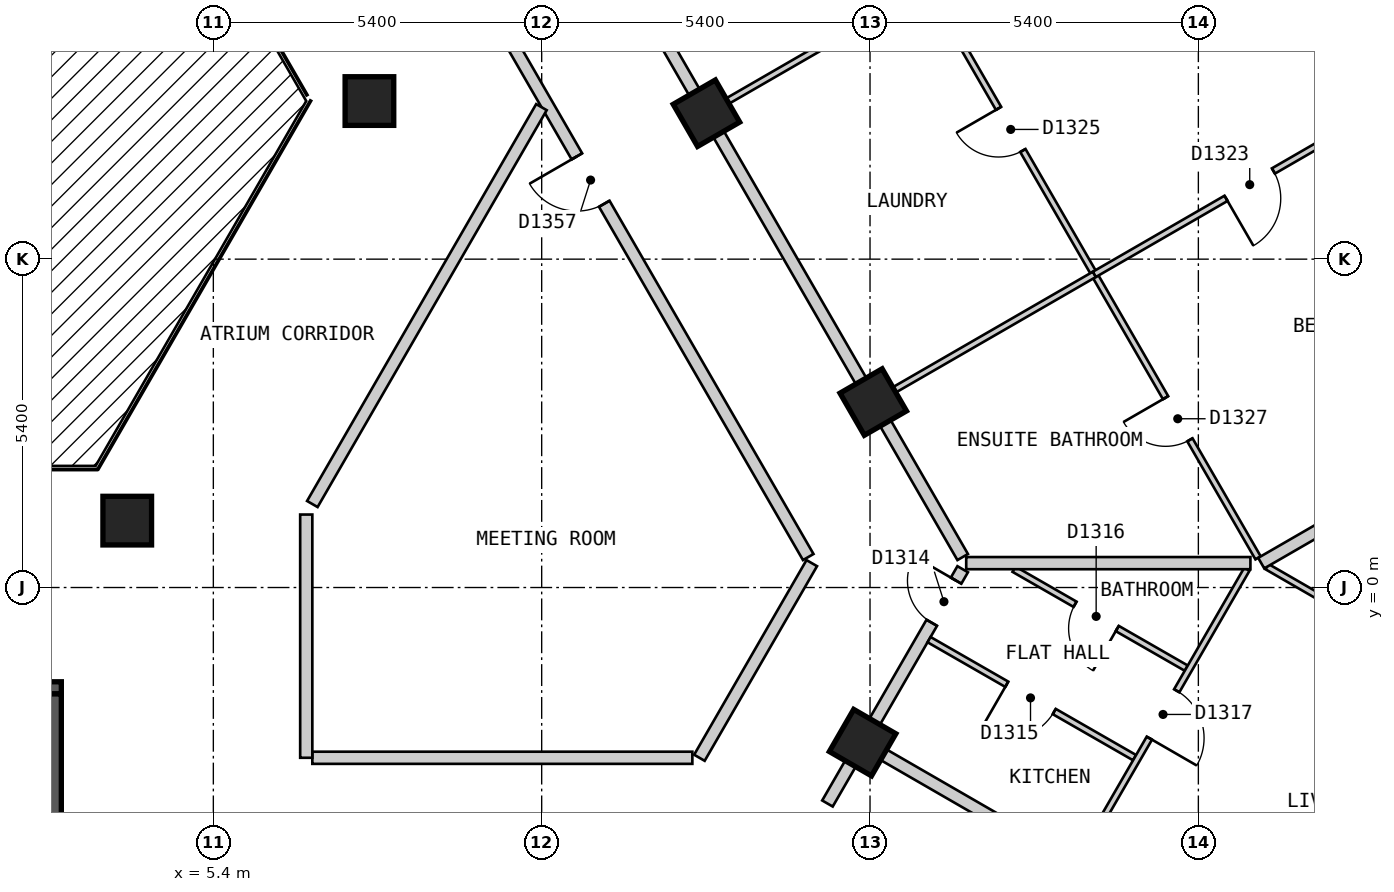
"""IFC4 building model, lengths in metres.
Left out: names, types, materials, properties, quantities, classifications, styles, units other than length and angle.
Written with IfcOpenShell. Run it as: python <this file> out.ifc"""

import sys

from ifc_helpers import new_model, si_unit, direction, frame, frame_2d, origin, origin_2d, place, context, subcontext, project, spatial, polyline, rectangle, outline, extrude, element, fill, save


model = new_model("IFC4")
c1 = context("Model", 3, precision=1e-05, world=origin(), true_north=direction((0.0, 1.0)))
c2 = subcontext(c1, "Body", "Model", "MODEL_VIEW")
j1 = project(units=[si_unit("LENGTHUNIT", "METRE"), si_unit("PLANEANGLEUNIT", "RADIAN")], contexts=[c1])
p1 = place(None, origin())
s1 = spatial("IfcSite", under=j1, at=p1, CompositionType="ELEMENT")
p2 = place(p1, origin())
s2 = spatial("IfcBuilding", under=s1, at=p2, CompositionType="ELEMENT")
p3 = place(p2, frame((0.0, 0.0, 135.6)))
s3 = spatial("IfcBuildingStorey", under=s2, at=p3, CompositionType="ELEMENT", Elevation=135.6)
for number, where, z_axis, x_axis in (
    (1, (16.078, -2.551, 0.0), (0.0, 0.0, 1.0), (0.5, 0.866, 0.0)),
    (2, (16.253, 3.05, 0.0), (0.0, 0.0, 1.0), (-0.5, 0.866, 0.0)),
    (3, (3.984, 1.1, 0.0), (0.0, 0.0, 1.0), (1.0, 0.0, 0.0)),
    (4, (13.51, 7.8, 0.0), (0.0, 0.0, 1.0), (-0.5, 0.866, 0.0)),
    (5, (7.967, 8.0, 0.0), (0.0, 0.0, 1.0), (1.0, 0.0, 0.0)),
):
    element("IfcColumn", number, at=place(p3, frame(where, z_axis=z_axis, x_axis=x_axis)), inside=s3, PredefinedType="COLUMN", context=c2, shape_type="SweptSolid", body=[
        extrude(rectangle(XDim=0.8, YDim=0.8, at=origin_2d()), origin(), (0.0, 0.0, 1.0), 3.0),
    ])
p4 = place(p3, frame((15.862, -23.425, 0.0), z_axis=(0.0, 0.0, 1.0), x_axis=(0.500017503135, 0.866015298109, 0.0)))
e6 = element("IfcWall", 6, at=p4, inside=s3, PredefinedType="SOLIDWALL", context=c2, shape_type="SweptSolid", body=[
    extrude(outline(polyline([(0.0, -0.15), (24.711, -0.15), (24.631, 0.15), (0.08, 0.15), (0.0, -0.15)])), origin(), (0.0, 0.0, 1.0), 2.7),
])
p5 = place(p4, frame((2.857, 0.0, 0.15)))
e7 = element("IfcOpeningElement", 7, at=p5, cuts=e6, PredefinedType="OPENING", context=c2, shape_type="SweptSolid", body=[
    extrude(rectangle(XDim=1.5, YDim=2.1, at=frame_2d((0.75, 1.05))), frame((0.0, 0.16, 0.0), z_axis=(0.0, -1.0, 0.0), x_axis=(1.0, 0.0, 0.0)), (0.0, 0.0, 1.0), 0.32),
])
p6 = place(p4, frame((8.689, 0.0, 0.15)))
e8 = element("IfcOpeningElement", 8, at=p6, cuts=e6, PredefinedType="OPENING", context=c2, shape_type="SweptSolid", body=[
    extrude(rectangle(XDim=1.5, YDim=2.1, at=frame_2d((0.75, 1.05))), frame((0.0, 0.16, 0.0), z_axis=(0.0, -1.0, 0.0), x_axis=(1.0, 0.0, 0.0)), (0.0, 0.0, 1.0), 0.32),
])
p7 = place(p4, frame((14.52, 0.0, 0.15)))
e9 = element("IfcOpeningElement", 9, at=p7, cuts=e6, PredefinedType="OPENING", context=c2, shape_type="SweptSolid", body=[
    extrude(rectangle(XDim=1.5, YDim=2.1, at=frame_2d((0.75, 1.05))), frame((0.0, 0.16, 0.0), z_axis=(0.0, -1.0, 0.0), x_axis=(1.0, 0.0, 0.0)), (0.0, 0.0, 1.0), 0.32),
])
p8 = place(p4, frame((20.351, 0.0, 0.15)))
e10 = element("IfcOpeningElement", 10, at=p8, cuts=e6, PredefinedType="OPENING", context=c2, shape_type="SweptSolid", body=[
    extrude(rectangle(XDim=1.5, YDim=2.1, at=frame_2d((0.75, 1.05))), frame((0.0, 0.16, 0.0), z_axis=(0.0, -1.0, 0.0), x_axis=(1.0, 0.0, 0.0)), (0.0, 0.0, 1.0), 0.32),
])
p9 = place(p3, frame((28.218, 2.825, 0.0), z_axis=(0.0, 0.0, 1.0), x_axis=(-0.500020536353, 0.866013546791, 0.0)))
e11 = element("IfcWall", 11, at=p9, inside=s3, PredefinedType="SOLIDWALL", context=c2, shape_type="SweptSolid", body=[
    extrude(outline(polyline([(0.0, -0.15), (23.325, -0.15), (23.245, 0.15), (0.08, 0.15), (0.0, -0.15)])), origin(), (0.0, 0.0, 1.0), 2.7),
])
p10 = place(p9, frame((2.685, 0.0, 0.15)))
e12 = element("IfcOpeningElement", 12, at=p10, cuts=e11, PredefinedType="OPENING", context=c2, shape_type="SweptSolid", body=[
    extrude(rectangle(XDim=1.5, YDim=2.1, at=frame_2d((0.75, 1.05))), frame((0.0, 0.16, 0.0), z_axis=(0.0, -1.0, 0.0), x_axis=(1.0, 0.0, 0.0)), (0.0, 0.0, 1.0), 0.32),
])
p11 = place(p9, frame((8.17, 0.0, 0.15)))
e13 = element("IfcOpeningElement", 13, at=p11, cuts=e11, PredefinedType="OPENING", context=c2, shape_type="SweptSolid", body=[
    extrude(rectangle(XDim=1.5, YDim=2.1, at=frame_2d((0.75, 1.05))), frame((0.0, 0.16, 0.0), z_axis=(0.0, -1.0, 0.0), x_axis=(1.0, 0.0, 0.0)), (0.0, 0.0, 1.0), 0.32),
])
p12 = place(p9, frame((13.655, 0.0, 0.15)))
e14 = element("IfcOpeningElement", 14, at=p12, cuts=e11, PredefinedType="OPENING", context=c2, shape_type="SweptSolid", body=[
    extrude(rectangle(XDim=1.5, YDim=2.1, at=frame_2d((0.75, 1.05))), frame((0.0, 0.16, 0.0), z_axis=(0.0, -1.0, 0.0), x_axis=(1.0, 0.0, 0.0)), (0.0, 0.0, 1.0), 0.32),
])
p13 = place(p9, frame((19.14, 0.0, 0.15)))
e15 = element("IfcOpeningElement", 15, at=p13, cuts=e11, PredefinedType="OPENING", context=c2, shape_type="SweptSolid", body=[
    extrude(rectangle(XDim=1.5, YDim=2.1, at=frame_2d((0.75, 1.05))), frame((0.0, 0.16, 0.0), z_axis=(0.0, -1.0, 0.0), x_axis=(1.0, 0.0, 0.0)), (0.0, 0.0, 1.0), 0.32),
])
p14 = place(p3, frame((-2.9, -1.65, 0.0), z_axis=(0.0, 0.0, 1.0), x_axis=(1.0, 0.0, 0.0)))
e16 = element("IfcWall", 16, at=p14, inside=s3, PredefinedType="SOLIDWALL", context=c2, shape_type="SweptSolid", body=[
    extrude(rectangle(XDim=5.8, YDim=0.2, at=frame_2d((2.9, 0.0))), origin(), (0.0, 0.0, 1.0), 2.7),
])
p15 = place(p14, frame((0.3, 0.0, 0.0)))
e17 = element("IfcOpeningElement", 17, at=p15, cuts=e16, PredefinedType="OPENING", context=c2, shape_type="SweptSolid", body=[
    extrude(rectangle(XDim=1.2, YDim=2.1, at=frame_2d((0.6, 1.05))), frame((0.0, 0.11, 0.0), z_axis=(0.0, -1.0, 0.0), x_axis=(1.0, 0.0, 0.0)), (0.0, 0.0, 1.0), 0.22),
])
p16 = place(p3, frame((2.8, -4.5, 0.0), z_axis=(0.0, 0.0, 1.0), x_axis=(0.0, 1.0, 0.0)))
e18 = element("IfcWall", 18, at=p16, inside=s3, PredefinedType="SOLIDWALL", context=c2, shape_type="SweptSolid", body=[
    extrude(rectangle(XDim=2.75, YDim=0.2, at=frame_2d((1.375, 0.0))), origin(), (0.0, 0.0, 1.0), 2.7),
])
p17 = place(p3, frame((7.967, 13.0, 0.0), z_axis=(0.0, 0.0, 1.0), x_axis=(0.50003774998, -0.866003607726, 0.0)))
e19 = element("IfcWall", 19, at=p17, inside=s3, PredefinedType="PARTITIONING", context=c2, shape_type="SweptSolid", body=[
    extrude(rectangle(XDim=14.433, YDim=0.2, at=frame_2d((7.217, 0.0))), origin(), (0.0, 0.0, 1.0), 2.7),
])
p18 = place(p17, frame((6.824, 0.0, 0.0)))
e20 = element("IfcOpeningElement", 20, at=p18, cuts=e19, PredefinedType="OPENING", context=c2, shape_type="SweptSolid", body=[
    extrude(rectangle(XDim=0.9, YDim=2.1, at=frame_2d((0.45, 1.05))), frame((0.0, 0.11, 0.0), z_axis=(0.0, -1.0, 0.0), x_axis=(1.0, 0.0, 0.0)), (0.0, 0.0, 1.0), 0.22),
])
p19 = place(p3, frame((9.296, 15.1, 0.0), z_axis=(0.0, 0.0, 1.0), x_axis=(0.499974024244, -0.866040400375, 0.0)))
e21 = element("IfcWall", 21, at=p19, inside=s3, PredefinedType="PARTITIONING", context=c2, shape_type="SweptSolid", body=[
    extrude(rectangle(XDim=16.857, YDim=0.2, at=frame_2d((8.429, 0.0))), origin(), (0.0, 0.0, 1.0), 2.7),
])
p20 = place(p19, frame((5.209, 0.0, 0.0)))
e22 = element("IfcOpeningElement", 22, at=p20, cuts=e21, PredefinedType="OPENING", context=c2, shape_type="SweptSolid", body=[
    extrude(rectangle(XDim=1.0, YDim=2.1, at=frame_2d((0.5, 1.05))), frame((0.0, 0.11, 0.0), z_axis=(0.0, -1.0, 0.0), x_axis=(1.0, 0.0, 0.0)), (0.0, 0.0, 1.0), 0.22),
])
p21 = place(p3, frame((7.028, -2.8, 0.0), z_axis=(0.0, 0.0, 1.0), x_axis=(1.0, 0.0, 0.0)))
e23 = element("IfcWall", 23, at=p21, inside=s3, PredefinedType="PARTITIONING", context=c2, shape_type="SweptSolid", body=[
    extrude(rectangle(XDim=6.25, YDim=0.2, at=frame_2d((3.125, 0.0))), origin(), (0.0, 0.0, 1.0), 2.7),
])
p22 = place(p3, frame((7.028, 1.373, 0.0), z_axis=(0.0, 0.0, 1.0), x_axis=(0.499954271211, 0.866051803703, 0.0)))
e24 = element("IfcWall", 24, at=p22, inside=s3, PredefinedType="PARTITIONING", context=c2, shape_type="SweptSolid", body=[
    extrude(rectangle(XDim=7.536, YDim=0.2, at=frame_2d((3.768, 0.0))), origin(), (0.0, 0.0, 1.0), 2.7),
])
p23 = place(p3, frame((13.394, -2.8, 0.0), z_axis=(0.0, 0.0, 1.0), x_axis=(0.499968324138, 0.866043691079, 0.0)))
e25 = element("IfcWall", 25, at=p23, inside=s3, PredefinedType="PARTITIONING", context=c2, shape_type="SweptSolid", body=[
    extrude(rectangle(XDim=3.696, YDim=0.2, at=frame_2d((1.848, 0.0))), origin(), (0.0, 0.0, 1.0), 2.7),
])
p24 = place(p3, frame((15.5, -3.552, 0.0), z_axis=(0.0, 0.0, 1.0), x_axis=(0.499928303779, 0.86606679366, 0.0)))
e26 = element("IfcWall", 26, at=p24, inside=s3, PredefinedType="PARTITIONING", context=c2, shape_type="SweptSolid", body=[
    extrude(rectangle(XDim=4.449, YDim=0.2, at=frame_2d((2.225, 0.0))), origin(), (0.0, 0.0, 1.0), 2.7),
])
p25 = place(p24, frame((3.432, 0.0, 0.0)))
e27 = element("IfcOpeningElement", 27, at=p25, cuts=e26, PredefinedType="OPENING", context=c2, shape_type="SweptSolid", body=[
    extrude(rectangle(XDim=0.8, YDim=2.1, at=frame_2d((0.4, 1.05))), frame((0.0, 0.11, 0.0), z_axis=(0.0, -1.0, 0.0), x_axis=(1.0, 0.0, 0.0)), (0.0, 0.0, 1.0), 0.22),
])
p26 = place(p3, frame((6.928, -2.8, 0.0), z_axis=(0.0, 0.0, 1.0), x_axis=(0.0, 1.0, 0.0)))
e28 = element("IfcWall", 28, at=p26, inside=s3, PredefinedType="PARTITIONING", context=c2, shape_type="SweptSolid", body=[
    extrude(rectangle(XDim=4.0, YDim=0.2, at=frame_2d((2.0, 0.0))), origin(), (0.0, 0.0, 1.0), 2.7),
])
p27 = place(p3, frame((11.713, 19.313, 0.0), z_axis=(0.0, 0.0, 1.0), x_axis=(0.499999523185, -0.866025679073, 0.0)))
e29 = element("IfcWall", 29, at=p27, inside=s3, PredefinedType="PARTITIONING", context=c2, shape_type="SweptSolid", body=[
    extrude(rectangle(XDim=21.738, YDim=0.1, at=frame_2d((10.869, 0.0))), origin(), (0.0, 0.0, 1.0), 2.7),
])
p28 = place(p27, frame((7.654, 0.0, 0.0)))
e30 = element("IfcOpeningElement", 30, at=p28, cuts=e29, PredefinedType="OPENING", context=c2, shape_type="SweptSolid", body=[
    extrude(rectangle(XDim=0.9, YDim=2.1, at=frame_2d((0.45, 1.05))), frame((0.0, 0.06, 0.0), z_axis=(0.0, -1.0, 0.0), x_axis=(1.0, 0.0, 0.0)), (0.0, 0.0, 1.0), 0.12),
])
p29 = place(p27, frame((13.202, 0.0, 0.0)))
e31 = element("IfcOpeningElement", 31, at=p29, cuts=e29, PredefinedType="OPENING", context=c2, shape_type="SweptSolid", body=[
    extrude(rectangle(XDim=0.8, YDim=2.1, at=frame_2d((0.4, 1.05))), frame((0.0, 0.06, 0.0), z_axis=(0.0, -1.0, 0.0), x_axis=(1.0, 0.0, 0.0)), (0.0, 0.0, 1.0), 0.12),
])
p30 = place(p27, frame((2.242, 0.0, 0.0)))
e32 = element("IfcOpeningElement", 32, at=p30, cuts=e29, PredefinedType="OPENING", context=c2, shape_type="SweptSolid", body=[
    extrude(rectangle(XDim=0.8, YDim=2.1, at=frame_2d((0.4, 1.05))), frame((0.0, 0.06, 0.0), z_axis=(0.0, -1.0, 0.0), x_axis=(1.0, 0.0, 0.0)), (0.0, 0.0, 1.0), 0.12),
])
p31 = place(p27, frame((18.696, 0.0, 0.0)))
e33 = element("IfcOpeningElement", 33, at=p31, cuts=e29, PredefinedType="OPENING", context=c2, shape_type="SweptSolid", body=[
    extrude(rectangle(XDim=0.8, YDim=2.1, at=frame_2d((0.4, 1.05))), frame((0.0, 0.06, 0.0), z_axis=(0.0, -1.0, 0.0), x_axis=(1.0, 0.0, 0.0)), (0.0, 0.0, 1.0), 0.12),
])
p32 = place(p3, frame((17.171, -0.857, 0.0), z_axis=(0.0, 0.0, 1.0), x_axis=(0.867173455867, -0.49800622229, 0.0)))
e34 = element("IfcWall", 34, at=p32, inside=s3, PredefinedType="PARTITIONING", context=c2, shape_type="SweptSolid", body=[
    extrude(rectangle(XDim=3.898, YDim=0.1, at=frame_2d((1.949, 0.0))), origin(), (0.0, 0.0, 1.0), 2.7),
])
p33 = place(p32, frame((1.474, 0.0, 0.0)))
e35 = element("IfcOpeningElement", 35, at=p33, cuts=e34, PredefinedType="OPENING", context=c2, shape_type="SweptSolid", body=[
    extrude(rectangle(XDim=0.9, YDim=2.1, at=frame_2d((0.45, 1.05))), frame((0.0, 0.06, 0.0), z_axis=(0.0, -1.0, 0.0), x_axis=(1.0, 0.0, 0.0)), (0.0, 0.0, 1.0), 0.12),
])
p34 = place(p3, frame((18.568, 0.301, 0.0), z_axis=(0.0, 0.0, 1.0), x_axis=(0.867155675456, -0.49803718187, 0.0)))
e36 = element("IfcWall", 36, at=p34, inside=s3, PredefinedType="PARTITIONING", context=c2, shape_type="SweptSolid", body=[
    extrude(rectangle(XDim=3.267, YDim=0.1, at=frame_2d((1.633, 0.0))), origin(), (0.0, 0.0, 1.0), 2.7),
])
p35 = place(p34, frame((1.158, 0.0, 0.0)))
e37 = element("IfcOpeningElement", 37, at=p35, cuts=e36, PredefinedType="OPENING", context=c2, shape_type="SweptSolid", body=[
    extrude(rectangle(XDim=0.8, YDim=2.1, at=frame_2d((0.4, 1.05))), frame((0.0, 0.06, 0.0), z_axis=(0.0, -1.0, 0.0), x_axis=(1.0, 0.0, 0.0)), (0.0, 0.0, 1.0), 0.12),
])
p36 = place(p3, frame((22.729, 0.343, 0.0), z_axis=(0.0, 0.0, 1.0), x_axis=(0.865996608848, -0.500049870977, 0.0)))
e38 = element("IfcWall", 38, at=p36, inside=s3, PredefinedType="PARTITIONING", context=c2, shape_type="SweptSolid", body=[
    extrude(rectangle(XDim=5.788, YDim=0.1, at=frame_2d((2.894, 0.0))), origin(), (0.0, 0.0, 1.0), 2.7),
])
p37 = place(p36, frame((2.386, 0.0, 0.0)))
e39 = element("IfcOpeningElement", 39, at=p37, cuts=e38, PredefinedType="OPENING", context=c2, shape_type="SweptSolid", body=[
    extrude(rectangle(XDim=0.9, YDim=2.1, at=frame_2d((0.45, 1.05))), frame((0.0, 0.06, 0.0), z_axis=(0.0, -1.0, 0.0), x_axis=(1.0, 0.0, 0.0)), (0.0, 0.0, 1.0), 0.12),
])
p38 = place(p3, frame((19.633, -4.488, 0.0), z_axis=(0.0, 0.0, 1.0), x_axis=(0.499989971015, 0.866031193944, 0.0)))
e40 = element("IfcWall", 40, at=p38, inside=s3, PredefinedType="PARTITIONING", context=c2, shape_type="SweptSolid", body=[
    extrude(rectangle(XDim=5.53, YDim=0.1, at=frame_2d((2.765, 0.0))), origin(), (0.0, 0.0, 1.0), 2.7),
])
p39 = place(p38, frame((2.322, 0.0, 0.0)))
e41 = element("IfcOpeningElement", 41, at=p39, cuts=e40, PredefinedType="OPENING", context=c2, shape_type="SweptSolid", body=[
    extrude(rectangle(XDim=0.9, YDim=2.1, at=frame_2d((0.45, 1.05))), frame((0.0, 0.06, 0.0), z_axis=(0.0, -1.0, 0.0), x_axis=(1.0, 0.0, 0.0)), (0.0, 0.0, 1.0), 0.12),
])
p40 = place(p3, frame((16.339, 3.1, 0.0), z_axis=(0.0, 0.0, 1.0), x_axis=(0.866050731258, 0.499956128963, 0.0)))
e42 = element("IfcWall", 42, at=p40, inside=s3, PredefinedType="PARTITIONING", context=c2, shape_type="SweptSolid", body=[
    extrude(rectangle(XDim=4.1, YDim=0.1, at=frame_2d((2.05, 0.0))), origin(), (0.0, 0.0, 1.0), 2.7),
])
p41 = place(p3, frame((13.597, 7.85, 0.0), z_axis=(0.0, 0.0, 1.0), x_axis=(0.866015917575, 0.500016430238, 0.0)))
e43 = element("IfcWall", 43, at=p41, inside=s3, PredefinedType="PARTITIONING", context=c2, shape_type="SweptSolid", body=[
    extrude(rectangle(XDim=4.05, YDim=0.1, at=frame_2d((2.025, 0.0))), origin(), (0.0, 0.0, 1.0), 2.7),
])
p42 = place(p3, frame((16.165, -2.601, 0.0), z_axis=(0.0, 0.0, 1.0), x_axis=(0.866016855193, -0.500014806302, 0.0)))
e44 = element("IfcWall", 44, at=p42, inside=s3, PredefinedType="PARTITIONING", context=c2, shape_type="SweptSolid", body=[
    extrude(rectangle(XDim=10.0, YDim=0.2, at=frame_2d((5.0, 0.0))), origin(), (0.0, 0.0, 1.0), 2.7),
])
p43 = place(p3, frame((17.782, 0.401, 0.0), z_axis=(0.0, 0.0, 1.0), x_axis=(1.0, 0.0, 0.0)))
e45 = element("IfcWall", 45, at=p43, inside=s3, PredefinedType="PARTITIONING", context=c2, shape_type="SweptSolid", body=[
    extrude(rectangle(XDim=4.674, YDim=0.2, at=frame_2d((2.337, 0.0))), origin(), (0.0, 0.0, 1.0), 2.7),
])
p44 = place(p3, frame((22.634, 0.401, 0.0), z_axis=(0.0, 0.0, 1.0), x_axis=(0.86601325737, 0.500021037617, 0.0)))
e46 = element("IfcWall", 46, at=p44, inside=s3, PredefinedType="PARTITIONING", context=c2, shape_type="SweptSolid", body=[
    extrude(rectangle(XDim=5.898, YDim=0.2, at=frame_2d((2.949, 0.0))), origin(), (0.0, 0.0, 1.0), 2.7),
])
p45 = place(p3, frame((19.89, 5.15, 0.0), z_axis=(0.0, 0.0, 1.0), x_axis=(0.865993310977, 0.500055582255, 0.0)))
e47 = element("IfcWall", 47, at=p45, inside=s3, PredefinedType="PARTITIONING", context=c2, shape_type="SweptSolid", body=[
    extrude(rectangle(XDim=5.9, YDim=0.1, at=frame_2d((2.95, 0.0))), origin(), (0.0, 0.0, 1.0), 2.7),
])
p46 = place(p45, frame((2.5, 0.0, 0.0)))
e48 = element("IfcOpeningElement", 48, at=p46, cuts=e47, PredefinedType="OPENING", context=c2, shape_type="SweptSolid", body=[
    extrude(rectangle(XDim=0.9, YDim=2.1, at=frame_2d((0.45, 1.05))), frame((0.0, 0.06, 0.0), z_axis=(0.0, -1.0, 0.0), x_axis=(1.0, 0.0, 0.0)), (0.0, 0.0, 1.0), 0.12),
])
p47 = place(p25, origin())
e49 = element("IfcDoor", 49, at=p47, inside=s3, OperationType="SINGLE_SWING_RIGHT", PredefinedType="DOOR", context=c2, shape_type="SweptSolid", body=[
    extrude(rectangle(XDim=0.8, YDim=2.1, at=frame_2d((0.4, 1.05))), frame((0.0, 0.025, 0.0), z_axis=(0.0, -1.0, 0.0), x_axis=(1.0, 0.0, 0.0)), (0.0, 0.0, 1.0), 0.05),
])
fill(e27, e49)
p48 = place(p33, origin())
e50 = element("IfcDoor", 50, at=p48, inside=s3, OperationType="SINGLE_SWING_LEFT", PredefinedType="DOOR", context=c2, shape_type="SweptSolid", body=[
    extrude(rectangle(XDim=0.9, YDim=2.1, at=frame_2d((0.45, 1.05))), frame((0.0, 0.025, 0.0), z_axis=(0.0, -1.0, 0.0), x_axis=(1.0, 0.0, 0.0)), (0.0, 0.0, 1.0), 0.05),
])
fill(e35, e50)
p49 = place(p35, origin())
e51 = element("IfcDoor", 51, at=p49, inside=s3, OperationType="SINGLE_SWING_RIGHT", PredefinedType="DOOR", context=c2, shape_type="SweptSolid", body=[
    extrude(rectangle(XDim=0.8, YDim=2.1, at=frame_2d((0.4, 1.05))), frame((0.0, 0.025, 0.0), z_axis=(0.0, -1.0, 0.0), x_axis=(1.0, 0.0, 0.0)), (0.0, 0.0, 1.0), 0.05),
])
fill(e37, e51)
p50 = place(p39, origin())
e52 = element("IfcDoor", 52, at=p50, inside=s3, OperationType="SINGLE_SWING_LEFT", PredefinedType="DOOR", context=c2, shape_type="SweptSolid", body=[
    extrude(rectangle(XDim=0.9, YDim=2.1, at=frame_2d((0.45, 1.05))), frame((0.0, 0.025, 0.0), z_axis=(0.0, -1.0, 0.0), x_axis=(1.0, 0.0, 0.0)), (0.0, 0.0, 1.0), 0.05),
])
fill(e41, e52)
p51 = place(p46, origin())
e53 = element("IfcDoor", 53, at=p51, inside=s3, OperationType="SINGLE_SWING_LEFT", PredefinedType="DOOR", context=c2, shape_type="SweptSolid", body=[
    extrude(rectangle(XDim=0.9, YDim=2.1, at=frame_2d((0.45, 1.05))), frame((0.0, 0.025, 0.0), z_axis=(0.0, -1.0, 0.0), x_axis=(1.0, 0.0, 0.0)), (0.0, 0.0, 1.0), 0.05),
])
fill(e48, e53)
p52 = place(p29, origin())
e54 = element("IfcDoor", 54, at=p52, inside=s3, OperationType="SINGLE_SWING_LEFT", PredefinedType="DOOR", context=c2, shape_type="SweptSolid", body=[
    extrude(rectangle(XDim=0.8, YDim=2.1, at=frame_2d((0.4, 1.05))), frame((0.0, 0.025, 0.0), z_axis=(0.0, -1.0, 0.0), x_axis=(1.0, 0.0, 0.0)), (0.0, 0.0, 1.0), 0.05),
])
fill(e31, e54)
p53 = place(p31, origin())
e55 = element("IfcDoor", 55, at=p53, inside=s3, OperationType="SINGLE_SWING_LEFT", PredefinedType="DOOR", context=c2, shape_type="SweptSolid", body=[
    extrude(rectangle(XDim=0.8, YDim=2.1, at=frame_2d((0.4, 1.05))), frame((0.0, 0.025, 0.0), z_axis=(0.0, -1.0, 0.0), x_axis=(1.0, 0.0, 0.0)), (0.0, 0.0, 1.0), 0.05),
])
fill(e33, e55)
p54 = place(p18, origin())
e56 = element("IfcDoor", 56, at=p54, inside=s3, OperationType="SINGLE_SWING_LEFT", PredefinedType="DOOR", context=c2, shape_type="SweptSolid", body=[
    extrude(rectangle(XDim=0.9, YDim=2.1, at=frame_2d((0.45, 1.05))), frame((0.0, 0.025, 0.0), z_axis=(0.0, -1.0, 0.0), x_axis=(1.0, 0.0, 0.0)), (0.0, 0.0, 1.0), 0.05),
])
fill(e20, e56)
save(model, sys.argv[1])
